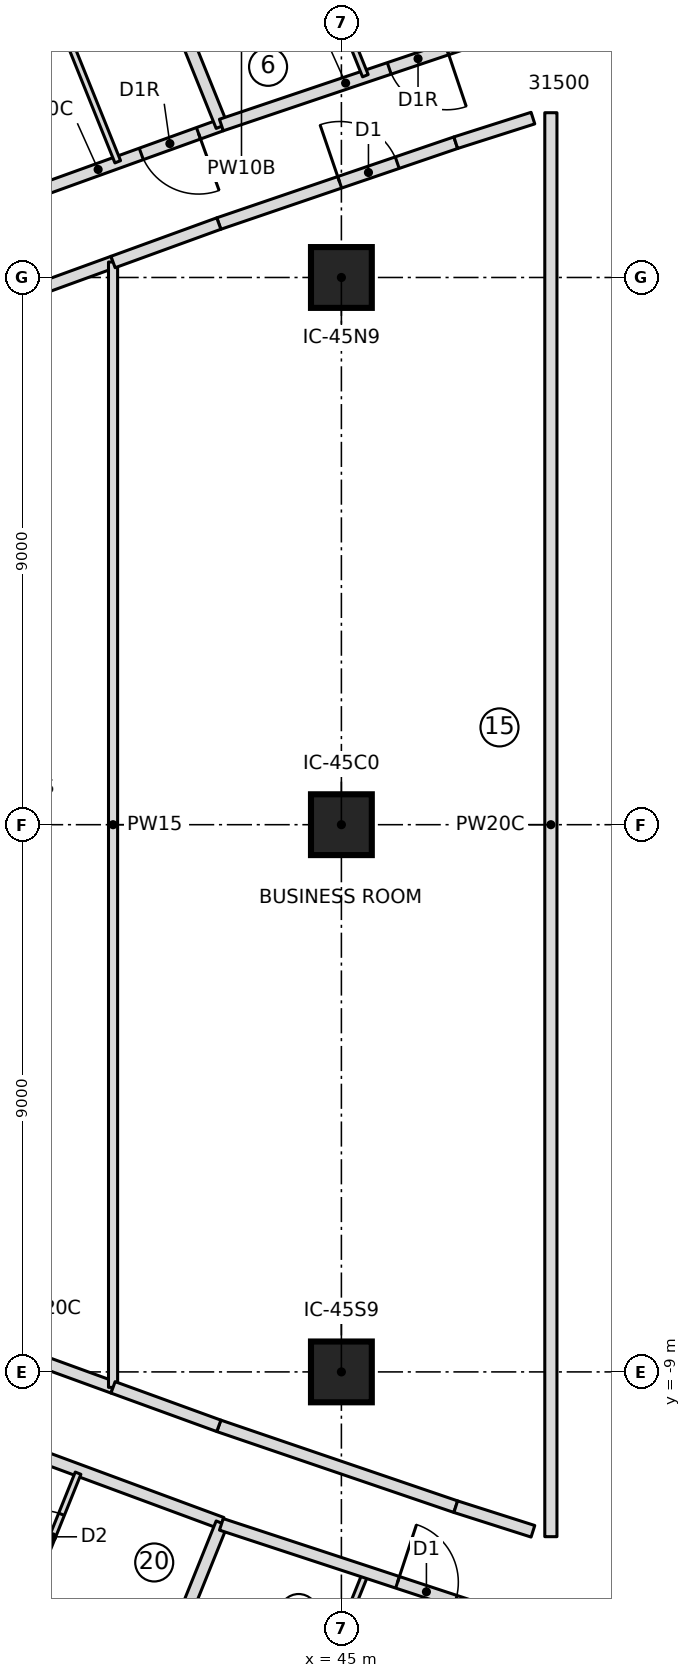
"""IFC4 building model, lengths in metres.
Left out: names, types, materials, properties, quantities, classifications, styles, units other than length and angle.
Written with IfcOpenShell. Run it as: python <this file> out.ifc"""

import sys

from ifc_helpers import new_model, si_unit, direction, frame, frame_2d, origin, origin_2d, place, context, subcontext, project, spatial, rectangle, extrude, element, fill, save


model = new_model("IFC4")
c1 = context("Model", 3, precision=1e-05, world=origin(), true_north=direction((0.0, 1.0)))
c2 = subcontext(c1, "Body", "Model", "MODEL_VIEW")
j1 = project(units=[si_unit("LENGTHUNIT", "METRE"), si_unit("PLANEANGLEUNIT", "RADIAN")], contexts=[c1])
p1 = place(None, origin())
s1 = spatial("IfcSite", under=j1, at=p1, CompositionType="ELEMENT")
p2 = place(p1, origin())
s2 = spatial("IfcBuilding", under=s1, at=p2, CompositionType="ELEMENT")
p3 = place(p2, frame((0.0, 0.0, 203.9)))
s3 = spatial("IfcBuildingStorey", under=s2, at=p3, CompositionType="ELEMENT", Elevation=203.9)
for number, where, z_axis, x_axis in (
    (1, (45.0, -9.0, 0.0), (0.0, 0.0, 1.0), (1.0, 0.0, 0.0)),
    (2, (45.0, 0.0, 0.0), (0.0, 0.0, 1.0), (1.0, 0.0, 0.0)),
    (3, (45.0, 9.0, 0.0), (0.0, 0.0, 1.0), (1.0, 0.0, 0.0)),
):
    element("IfcColumn", number, at=place(p3, frame(where, z_axis=z_axis, x_axis=x_axis)), inside=s3, PredefinedType="COLUMN", context=c2, shape_type="SweptSolid", body=[
        extrude(rectangle(XDim=1.0, YDim=1.0, at=origin_2d()), origin(), (0.0, 0.0, 1.0), 3.55),
    ])
p4 = place(p3, frame((43.026, 11.507, 0.0), z_axis=(0.0, 0.0, 1.0), x_axis=(-0.940653905433, -0.339367397069, 0.0)))
e4 = element("IfcWall", 4, at=p4, inside=s3, PredefinedType="PARTITIONING", context=c2, shape_type="SweptSolid", body=[
    extrude(rectangle(XDim=4.309, YDim=0.2, at=frame_2d((2.155, 0.0))), origin(), (0.0, 0.0, 1.0), 3.25),
])
p5 = place(p4, frame((0.4, 0.0, 0.0)))
e5 = element("IfcOpeningElement", 5, at=p5, cuts=e4, PredefinedType="OPENING", context=c2, shape_type="SweptSolid", body=[
    extrude(rectangle(XDim=1.0, YDim=2.1, at=frame_2d((0.5, 1.05))), frame((0.0, 0.11, 0.0), z_axis=(0.0, -1.0, 0.0), x_axis=(1.0, 0.0, 0.0)), (0.0, 0.0, 1.0), 0.22),
])
p6 = place(p3, frame((38.119, 12.161, 0.0), z_axis=(0.0, 0.0, 1.0), x_axis=(0.939744972593, 0.341876273652, 0.0)))
e6 = element("IfcWall", 6, at=p6, inside=s3, PredefinedType="PARTITIONING", context=c2, shape_type="SweptSolid", body=[
    extrude(rectangle(XDim=2.501, YDim=0.1, at=frame_2d((1.251, 0.0))), origin(), (0.0, 0.0, 1.0), 3.25),
])
p7 = place(p6, frame((0.85, 0.0, 0.0)))
e7 = element("IfcOpeningElement", 7, at=p7, cuts=e6, PredefinedType="OPENING", context=c2, shape_type="SweptSolid", body=[
    extrude(rectangle(XDim=0.8, YDim=2.1, at=frame_2d((0.4, 1.05))), frame((0.0, 0.06, 0.0), z_axis=(0.0, -1.0, 0.0), x_axis=(1.0, 0.0, 0.0)), (0.0, 0.0, 1.0), 0.12),
])
p8 = place(p3, frame((40.47, 13.016, 0.0), z_axis=(0.0, 0.0, 1.0), x_axis=(0.373846436826, -0.927490615409, 0.0)))
e8 = element("IfcWall", 8, at=p8, inside=s3, PredefinedType="PARTITIONING", context=c2, shape_type="SweptSolid", body=[
    extrude(rectangle(XDim=2.279, YDim=0.1, at=frame_2d((1.139, 0.0))), origin(), (0.0, 0.0, 1.0), 3.25),
])
p9 = place(p3, frame((43.033, 11.489, 0.0), z_axis=(0.0, 0.0, 1.0), x_axis=(-0.373877998371, 0.927477893178, 0.0)))
e9 = element("IfcWall", 9, at=p9, inside=s3, PredefinedType="PARTITIONING", context=c2, shape_type="SweptSolid", body=[
    extrude(rectangle(XDim=7.611, YDim=0.2, at=frame_2d((3.806, 0.0))), origin(), (0.0, 0.0, 1.0), 3.25),
])
p10 = place(p3, frame((47.113, 12.886, 0.0), z_axis=(0.0, 0.0, 1.0), x_axis=(-0.947550995841, -0.319604615549, 0.0)))
e10 = element("IfcWall", 10, at=p10, inside=s3, PredefinedType="PARTITIONING", context=c2, shape_type="SweptSolid", body=[
    extrude(rectangle(XDim=4.314, YDim=0.2, at=frame_2d((2.157, 0.0))), origin(), (0.0, 0.0, 1.0), 3.25),
])
p11 = place(p10, frame((0.4, 0.0, 0.0)))
e11 = element("IfcOpeningElement", 11, at=p11, cuts=e10, PredefinedType="OPENING", context=c2, shape_type="SweptSolid", body=[
    extrude(rectangle(XDim=1.0, YDim=2.1, at=frame_2d((0.5, 1.05))), frame((0.0, 0.11, 0.0), z_axis=(0.0, -1.0, 0.0), x_axis=(1.0, 0.0, 0.0)), (0.0, 0.0, 1.0), 0.22),
])
p12 = place(p3, frame((44.542, 14.434, 0.0), z_axis=(0.0, 0.0, 1.0), x_axis=(0.373917841166, -0.927461831052, 0.0)))
e12 = element("IfcWall", 12, at=p12, inside=s3, PredefinedType="PARTITIONING", context=c2, shape_type="SweptSolid", body=[
    extrude(rectangle(XDim=2.281, YDim=0.1, at=frame_2d((1.14, 0.0))), origin(), (0.0, 0.0, 1.0), 3.25),
])
p13 = place(p3, frame((34.948, -8.497, 0.0), z_axis=(0.0, 0.0, 1.0), x_axis=(0.937864515454, -0.347001657996, 0.0)))
e13 = element("IfcWall", 13, at=p13, inside=s3, PredefinedType="PARTITIONING", context=c2, shape_type="SweptSolid", body=[
    extrude(rectangle(XDim=8.621, YDim=0.2, at=frame_2d((4.311, 0.0))), origin(), (0.0, 0.0, 1.0), 3.25),
])
p14 = place(p13, frame((0.35, 0.0, 0.0)))
e14 = element("IfcOpeningElement", 14, at=p14, cuts=e13, PredefinedType="OPENING", context=c2, shape_type="SweptSolid", body=[
    extrude(rectangle(XDim=1.0, YDim=2.1, at=frame_2d((0.5, 1.05))), frame((0.0, 0.11, 0.0), z_axis=(0.0, -1.0, 0.0), x_axis=(1.0, 0.0, 0.0)), (0.0, 0.0, 1.0), 0.22),
])
p15 = place(p3, frame((39.818, -12.779, 0.0), z_axis=(0.0, 0.0, 1.0), x_axis=(0.373883593317, 0.927475637765, 0.0)))
e15 = element("IfcWall", 15, at=p15, inside=s3, PredefinedType="PARTITIONING", context=c2, shape_type="SweptSolid", body=[
    extrude(rectangle(XDim=2.278, YDim=0.1, at=frame_2d((1.139, 0.0))), origin(), (0.0, 0.0, 1.0), 3.25),
])
p16 = place(p15, frame((0.75, 0.0, 0.0)))
e16 = element("IfcOpeningElement", 16, at=p16, cuts=e15, PredefinedType="OPENING", context=c2, shape_type="SweptSolid", body=[
    extrude(rectangle(XDim=0.8, YDim=2.1, at=frame_2d((0.4, 1.05))), frame((0.0, 0.06, 0.0), z_axis=(0.0, -1.0, 0.0), x_axis=(1.0, 0.0, 0.0)), (0.0, 0.0, 1.0), 0.12),
])
p17 = place(p3, frame((40.188, -18.548, 0.0), z_axis=(0.0, 0.0, 1.0), x_axis=(0.373877998371, 0.927477893178, 0.0)))
e17 = element("IfcWall", 17, at=p17, inside=s3, PredefinedType="PARTITIONING", context=c2, shape_type="SweptSolid", body=[
    extrude(rectangle(XDim=7.611, YDim=0.2, at=frame_2d((3.806, 0.0))), origin(), (0.0, 0.0, 1.0), 3.25),
])
p18 = place(p3, frame((45.395, -12.318, 0.0), z_axis=(0.0, 0.0, 1.0), x_axis=(-0.373917841166, -0.927461831052, 0.0)))
e18 = element("IfcWall", 18, at=p18, inside=s3, PredefinedType="PARTITIONING", context=c2, shape_type="SweptSolid", body=[
    extrude(rectangle(XDim=2.281, YDim=0.1, at=frame_2d((1.14, 0.0))), origin(), (0.0, 0.0, 1.0), 3.25),
])
for number, where, z_axis, x_axis in (
    (19, (39.115, 8.479, 0.0), (0.0, 0.0, 1.0), (0.94, 0.342, 0.0)),
    (20, (41.245, -9.254, 0.0), (0.0, 0.0, 1.0), (-0.94, 0.342, 0.0)),
):
    element("IfcWall", number, at=place(p3, frame(where, z_axis=z_axis, x_axis=x_axis)), inside=s3, PredefinedType="PARTITIONING", context=c2, shape_type="SweptSolid", body=[
        extrude(rectangle(XDim=2.266, YDim=0.2, at=frame_2d((1.133, 0.0))), origin(), (0.0, 0.0, 1.0), 3.25),
    ])
p19 = place(p3, frame((41.245, -9.254, 0.0), z_axis=(0.0, 0.0, 1.0), x_axis=(0.0, 1.0, 0.0)))
e21 = element("IfcWall", 21, at=p19, inside=s3, PredefinedType="PARTITIONING", context=c2, shape_type="SweptSolid", body=[
    extrude(rectangle(XDim=18.508, YDim=0.15, at=frame_2d((9.254, 0.0))), origin(), (0.0, 0.0, 1.0), 3.25),
])
p20 = place(p3, frame((42.984, 9.887, 0.0), z_axis=(0.0, 0.0, 1.0), x_axis=(0.946436071896, 0.322891253852, 0.0)))
e22 = element("IfcWall", 22, at=p20, inside=s3, PredefinedType="PARTITIONING", context=c2, shape_type="SweptSolid", body=[
    extrude(rectangle(XDim=4.117, YDim=0.2, at=frame_2d((2.059, 0.0))), origin(), (0.0, 0.0, 1.0), 3.25),
])
p21 = place(p20, frame((2.1, 0.0, 0.0)))
e23 = element("IfcOpeningElement", 23, at=p21, cuts=e22, PredefinedType="OPENING", context=c2, shape_type="SweptSolid", body=[
    extrude(rectangle(XDim=1.0, YDim=2.1, at=frame_2d((0.5, 1.05))), frame((0.0, 0.11, 0.0), z_axis=(0.0, -1.0, 0.0), x_axis=(1.0, 0.0, 0.0)), (0.0, 0.0, 1.0), 0.22),
])
p22 = place(p3, frame((46.881, -11.217, 0.0), z_axis=(0.0, 0.0, 1.0), x_axis=(-0.946436071896, 0.322891253852, 0.0)))
e24 = element("IfcWall", 24, at=p22, inside=s3, PredefinedType="PARTITIONING", context=c2, shape_type="SweptSolid", body=[
    extrude(rectangle(XDim=4.117, YDim=0.2, at=frame_2d((2.059, 0.0))), origin(), (0.0, 0.0, 1.0), 3.25),
])
for number, where, z_axis, x_axis in (
    (25, (42.984, -9.887, 0.0), (0.0, 0.0, 1.0), (-0.94, 0.342, 0.0)),
    (26, (41.245, 9.254, 0.0), (0.0, 0.0, 1.0), (0.94, 0.342, 0.0)),
):
    element("IfcWall", number, at=place(p3, frame(where, z_axis=z_axis, x_axis=x_axis)), inside=s3, PredefinedType="PARTITIONING", context=c2, shape_type="SweptSolid", body=[
        extrude(rectangle(XDim=1.851, YDim=0.2, at=frame_2d((0.926, 0.0))), origin(), (0.0, 0.0, 1.0), 3.25),
    ])
p23 = place(p3, frame((43.026, -11.507, 0.0), z_axis=(0.0, 0.0, 1.0), x_axis=(0.949951949432, -0.312396052744, 0.0)))
e27 = element("IfcWall", 27, at=p23, inside=s3, PredefinedType="PARTITIONING", context=c2, shape_type="SweptSolid", body=[
    extrude(rectangle(XDim=5.394, YDim=0.2, at=frame_2d((2.697, 0.0))), origin(), (0.0, 0.0, 1.0), 3.25),
])
p24 = place(p23, frame((3.05, 0.0, 0.0)))
e28 = element("IfcOpeningElement", 28, at=p24, cuts=e27, PredefinedType="OPENING", context=c2, shape_type="SweptSolid", body=[
    extrude(rectangle(XDim=1.0, YDim=2.1, at=frame_2d((0.5, 1.05))), frame((0.0, 0.11, 0.0), z_axis=(0.0, -1.0, 0.0), x_axis=(1.0, 0.0, 0.0)), (0.0, 0.0, 1.0), 0.22),
])
for number, where, z_axis, x_axis in (
    (29, (46.881, 11.217, 0.0), (0.0, 0.0, 1.0), (0.953, 0.304, 0.0)),
    (30, (48.15, -11.621, 0.0), (0.0, 0.0, 1.0), (-0.953, 0.304, 0.0)),
):
    element("IfcWall", number, at=place(p3, frame(where, z_axis=z_axis, x_axis=x_axis)), inside=s3, PredefinedType="PARTITIONING", context=c2, shape_type="SweptSolid", body=[
        extrude(rectangle(XDim=1.332, YDim=0.2, at=frame_2d((0.666, 0.0))), origin(), (0.0, 0.0, 1.0), 3.25),
    ])
p25 = place(p3, frame((48.445, 11.71, 0.0), z_axis=(0.0, 0.0, 1.0), x_axis=(0.0, -1.0, 0.0)))
e31 = element("IfcWall", 31, at=p25, inside=s3, PredefinedType="PARTITIONING", context=c2, shape_type="SweptSolid", body=[
    extrude(rectangle(XDim=23.42, YDim=0.2, at=frame_2d((11.71, 0.0))), origin(), (0.0, 0.0, 1.0), 3.25),
])
p26 = place(p5, origin())
e32 = element("IfcDoor", 32, at=p26, inside=s3, OperationType="SINGLE_SWING_RIGHT", PredefinedType="DOOR", context=c2, shape_type="SweptSolid", body=[
    extrude(rectangle(XDim=1.0, YDim=2.1, at=frame_2d((0.5, 1.05))), frame((0.0, 0.025, 0.0), z_axis=(0.0, -1.0, 0.0), x_axis=(1.0, 0.0, 0.0)), (0.0, 0.0, 1.0), 0.05),
])
fill(e5, e32)
p27 = place(p11, origin())
e33 = element("IfcDoor", 33, at=p27, inside=s3, OperationType="SINGLE_SWING_RIGHT", PredefinedType="DOOR", context=c2, shape_type="SweptSolid", body=[
    extrude(rectangle(XDim=1.0, YDim=2.1, at=frame_2d((0.5, 1.05))), frame((0.0, 0.025, 0.0), z_axis=(0.0, -1.0, 0.0), x_axis=(1.0, 0.0, 0.0)), (0.0, 0.0, 1.0), 0.05),
])
fill(e11, e33)
p28 = place(p16, origin())
e34 = element("IfcDoor", 34, at=p28, inside=s3, OperationType="SINGLE_SWING_LEFT", PredefinedType="DOOR", context=c2, shape_type="SweptSolid", body=[
    extrude(rectangle(XDim=0.8, YDim=2.1, at=frame_2d((0.4, 1.05))), frame((0.0, 0.025, 0.0), z_axis=(0.0, -1.0, 0.0), x_axis=(1.0, 0.0, 0.0)), (0.0, 0.0, 1.0), 0.05),
])
fill(e16, e34)
p29 = place(p24, origin())
e35 = element("IfcDoor", 35, at=p29, inside=s3, OperationType="SINGLE_SWING_LEFT", PredefinedType="DOOR", context=c2, shape_type="SweptSolid", body=[
    extrude(rectangle(XDim=1.0, YDim=2.1, at=frame_2d((0.5, 1.05))), frame((0.0, 0.025, 0.0), z_axis=(0.0, -1.0, 0.0), x_axis=(1.0, 0.0, 0.0)), (0.0, 0.0, 1.0), 0.05),
])
fill(e28, e35)
p30 = place(p21, origin())
e36 = element("IfcDoor", 36, at=p30, inside=s3, OperationType="SINGLE_SWING_LEFT", PredefinedType="DOOR", context=c2, shape_type="SweptSolid", body=[
    extrude(rectangle(XDim=1.0, YDim=2.1, at=frame_2d((0.5, 1.05))), frame((0.0, 0.025, 0.0), z_axis=(0.0, -1.0, 0.0), x_axis=(1.0, 0.0, 0.0)), (0.0, 0.0, 1.0), 0.05),
])
fill(e23, e36)
save(model, sys.argv[1])
